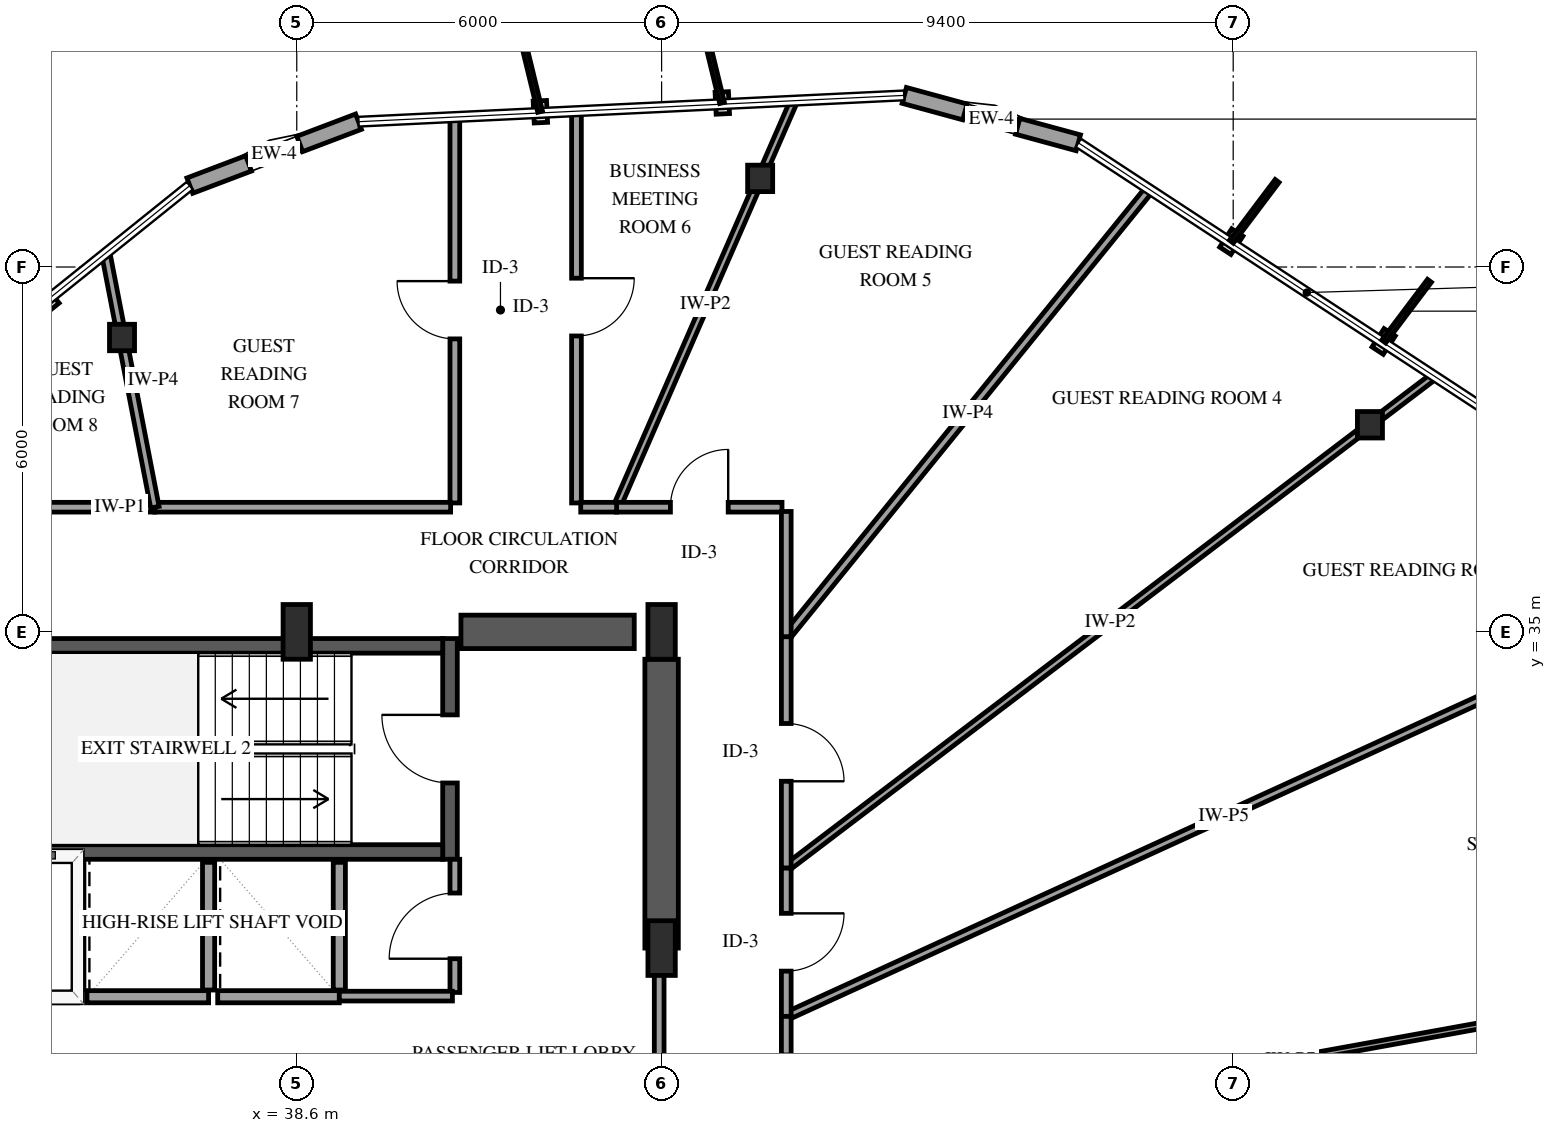
"""IFC4 building model, lengths in metres.
Left out: names, types, materials, properties, quantities, classifications, styles, units other than length and angle.
Written with IfcOpenShell. Run it as: python <this file> out.ifc"""

import sys

from ifc_helpers import new_model, si_unit, direction, frame, frame_2d, origin, origin_2d, place, context, subcontext, project, spatial, rectangle, i_section, extrude, element, fill, save


model = new_model("IFC4")
c1 = context("Model", 3, precision=1e-05, world=origin(), true_north=direction((0.0, 1.0)))
c2 = subcontext(c1, "Body", "Model", "MODEL_VIEW")
j1 = project(units=[si_unit("LENGTHUNIT", "METRE"), si_unit("PLANEANGLEUNIT", "RADIAN")], contexts=[c1])
p1 = place(None, origin())
s1 = spatial("IfcSite", under=j1, at=p1, CompositionType="ELEMENT")
p2 = place(p1, origin())
s2 = spatial("IfcBuilding", under=s1, at=p2, CompositionType="ELEMENT")
p3 = place(p2, frame((0.0, 0.0, 175.0)))
s3 = spatial("IfcBuildingStorey", under=s2, at=p3, CompositionType="ELEMENT", Elevation=175.0)
p4 = place(p3, frame((41.12, 31.26, 0.0), z_axis=(0.0, 0.0, 1.0), x_axis=(0.0, 1.0, 0.0)))
e1 = element("IfcWall", 1, at=p4, inside=s3, PredefinedType="SHEAR", context=c2, shape_type="SweptSolid", body=[
    extrude(rectangle(XDim=3.63, YDim=0.24, at=frame_2d((1.815, 0.0))), origin(), (0.0, 0.0, 1.0), 3.6),
])
p5 = place(p4, frame((1.255, 0.0, 0.0)))
e2 = element("IfcOpeningElement", 2, at=p5, cuts=e1, PredefinedType="OPENING", context=c2, shape_type="SweptSolid", body=[
    extrude(rectangle(XDim=1.12, YDim=2.15, at=frame_2d((0.56, 1.075))), frame((0.0, 0.13, 0.0), z_axis=(0.0, -1.0, 0.0), x_axis=(1.0, 0.0, 0.0)), (0.0, 0.0, 1.0), 0.26),
])
for number, where, z_axis, x_axis in (
    (3, (33.0, 31.38, 0.0), (0.0, 0.0, 1.0), (1.0, 0.0, 0.0)),
    (4, (33.0, 34.77, 0.0), (0.0, 0.0, 1.0), (1.0, 0.0, 0.0)),
):
    element("IfcWall", number, at=place(p3, frame(where, z_axis=z_axis, x_axis=x_axis)), inside=s3, PredefinedType="SHEAR", context=c2, shape_type="SweptSolid", body=[
        extrude(rectangle(XDim=8.0, YDim=0.24, at=frame_2d((4.0, 0.0))), origin(), (0.0, 0.0, 1.0), 3.6),
    ])
p6 = place(p3, frame((41.3, 35.0, 0.0), z_axis=(0.0, 0.0, 1.0), x_axis=(1.0, 0.0, 0.0)))
e5 = element("IfcWall", 5, at=p6, inside=s3, PredefinedType="SHEAR", context=c2, shape_type="SweptSolid", body=[
    extrude(rectangle(XDim=2.85, YDim=0.55, at=frame_2d((1.425, 0.0))), origin(), (0.0, 0.0, 1.0), 3.6),
])
p7 = place(p3, frame((44.6, 29.8, 0.0), z_axis=(0.0, 0.0, 1.0), x_axis=(0.0, 1.0, 0.0)))
e6 = element("IfcWall", 6, at=p7, inside=s3, PredefinedType="SHEAR", context=c2, shape_type="SweptSolid", body=[
    extrude(rectangle(XDim=4.75, YDim=0.55, at=frame_2d((2.375, 0.0))), origin(), (0.0, 0.0, 1.0), 3.6),
])
for number, where, z_axis, x_axis in (
    (7, (38.6, 35.0, 0.0), (0.0, 0.0, 1.0), (1.0, 0.0, 0.0)),
    (8, (44.6, 29.8, 0.0), (0.0, 0.0, 1.0), (1.0, 0.0, 0.0)),
    (9, (44.6, 35.0, 0.0), (0.0, 0.0, 1.0), (1.0, 0.0, 0.0)),
):
    element("IfcColumn", number, at=place(p3, frame(where, z_axis=z_axis, x_axis=x_axis)), inside=s3, PredefinedType="PILASTER", context=c2, shape_type="SweptSolid", body=[
        extrude(rectangle(XDim=0.45, YDim=0.9, at=origin_2d()), origin(), (0.0, 0.0, 1.0), 3.6),
    ])
for number, where, z_axis, x_axis in (
    (10, (56.249, 38.406, 0.0), (0.0, 0.0, 1.0), (1.0, 0.0, 0.0)),
    (11, (46.221, 42.458, 0.0), (0.0, 0.0, 1.0), (1.0, 0.0, 0.0)),
    (12, (35.726, 39.841, 0.0), (0.0, 0.0, 1.0), (1.0, 0.0, 0.0)),
):
    element("IfcColumn", number, at=place(p3, frame(where, z_axis=z_axis, x_axis=x_axis)), inside=s3, PredefinedType="COLUMN", context=c2, shape_type="SweptSolid", body=[
        extrude(i_section(OverallWidth=0.412, OverallDepth=0.435, WebThickness=0.036, FlangeThickness=0.057, FilletRadius=0.038, at=origin_2d()), origin(), (0.0, 0.0, 1.0), 3.6),
    ])
p8 = place(p3, frame((51.453, 43.042, 0.0), z_axis=(0.0, 0.0, 1.0), x_axis=(-0.964809388606, 0.262950268412, 0.0)))
e13 = element("IfcWall", 13, at=p8, inside=s3, PredefinedType="SOLIDWALL", context=c2, shape_type="SweptSolid", body=[
    extrude(rectangle(XDim=2.967, YDim=0.27, at=frame_2d((1.483, 0.0))), origin(), (0.0, 0.0, 1.0), 2.679),
])
p9 = place(p8, frame((1.033, 0.0, 0.75)))
e14 = element("IfcOpeningElement", 14, at=p9, cuts=e13, PredefinedType="OPENING", context=c2, shape_type="SweptSolid", body=[
    extrude(rectangle(XDim=0.9, YDim=1.5, at=frame_2d((0.45, 0.75))), frame((0.0, 0.145, 0.0), z_axis=(0.0, -1.0, 0.0), x_axis=(1.0, 0.0, 0.0)), (0.0, 0.0, 1.0), 0.29),
])
p10 = place(p3, frame((39.615, 43.39, 0.0), z_axis=(0.0, 0.0, 1.0), x_axis=(-0.935082186691, -0.354430958204, 0.0)))
e15 = element("IfcWall", 15, at=p10, inside=s3, PredefinedType="SOLIDWALL", context=c2, shape_type="SweptSolid", body=[
    extrude(rectangle(XDim=2.967, YDim=0.27, at=frame_2d((1.483, 0.0))), origin(), (0.0, 0.0, 1.0), 2.679),
])
p11 = place(p10, frame((1.033, 0.0, 0.75)))
e16 = element("IfcOpeningElement", 16, at=p11, cuts=e15, PredefinedType="OPENING", context=c2, shape_type="SweptSolid", body=[
    extrude(rectangle(XDim=0.9, YDim=1.5, at=frame_2d((0.45, 0.75))), frame((0.0, 0.145, 0.0), z_axis=(0.0, -1.0, 0.0), x_axis=(1.0, 0.0, 0.0)), (0.0, 0.0, 1.0), 0.29),
])
p12 = place(p3, frame((32.72, 29.0, 0.0), z_axis=(0.0, 0.0, 1.0), x_axis=(1.0, 0.0, 0.0)))
e17 = element("IfcWall", 17, at=p12, inside=s3, PredefinedType="SOLIDWALL", context=c2, shape_type="SweptSolid", body=[
    extrude(rectangle(XDim=2.28, YDim=0.2, at=frame_2d((1.14, 0.0))), origin(), (0.0, 0.0, 1.0), 3.3),
])
p13 = place(p12, frame((0.59, 0.0, 0.0)))
e18 = element("IfcOpeningElement", 18, at=p13, cuts=e17, PredefinedType="OPENING", context=c2, shape_type="SweptSolid", body=[
    extrude(rectangle(XDim=1.1, YDim=2.15, at=frame_2d((0.55, 1.075))), frame((0.0, 0.11, 0.0), z_axis=(0.0, -1.0, 0.0), x_axis=(1.0, 0.0, 0.0)), (0.0, 0.0, 1.0), 0.22),
])
p14 = place(p3, frame((35.0, 29.11, 0.0), z_axis=(0.0, 0.0, 1.0), x_axis=(0.0, 1.0, 0.0)))
e19 = element("IfcWall", 19, at=p14, inside=s3, PredefinedType="SOLIDWALL", context=c2, shape_type="SweptSolid", body=[
    extrude(rectangle(XDim=2.1, YDim=0.2, at=frame_2d((1.05, 0.0))), origin(), (0.0, 0.0, 1.0), 3.3),
])
p15 = place(p3, frame((35.15, 29.0, 0.0), z_axis=(0.0, 0.0, 1.0), x_axis=(1.0, 0.0, 0.0)))
e20 = element("IfcWall", 20, at=p15, inside=s3, PredefinedType="SOLIDWALL", context=c2, shape_type="SweptSolid", body=[
    extrude(rectangle(XDim=2.0, YDim=0.2, at=frame_2d((1.0, 0.0))), origin(), (0.0, 0.0, 1.0), 3.3),
])
p16 = place(p3, frame((37.15, 29.11, 0.0), z_axis=(0.0, 0.0, 1.0), x_axis=(0.0, 1.0, 0.0)))
e21 = element("IfcWall", 21, at=p16, inside=s3, PredefinedType="SOLIDWALL", context=c2, shape_type="SweptSolid", body=[
    extrude(rectangle(XDim=2.1, YDim=0.2, at=frame_2d((1.05, 0.0))), origin(), (0.0, 0.0, 1.0), 3.3),
])
p17 = place(p3, frame((37.3, 29.0, 0.0), z_axis=(0.0, 0.0, 1.0), x_axis=(1.0, 0.0, 0.0)))
e22 = element("IfcWall", 22, at=p17, inside=s3, PredefinedType="SOLIDWALL", context=c2, shape_type="SweptSolid", body=[
    extrude(rectangle(XDim=2.0, YDim=0.2, at=frame_2d((1.0, 0.0))), origin(), (0.0, 0.0, 1.0), 3.3),
])
p18 = place(p3, frame((39.3, 29.11, 0.0), z_axis=(0.0, 0.0, 1.0), x_axis=(0.0, 1.0, 0.0)))
e23 = element("IfcWall", 23, at=p18, inside=s3, PredefinedType="SOLIDWALL", context=c2, shape_type="SweptSolid", body=[
    extrude(rectangle(XDim=2.1, YDim=0.2, at=frame_2d((1.05, 0.0))), origin(), (0.0, 0.0, 1.0), 3.3),
])
p19 = place(p3, frame((46.65, 26.458, 0.0), z_axis=(0.0, 0.0, 1.0), x_axis=(0.984001322832, 0.178161153633, 0.0)))
e24 = element("IfcWall", 24, at=p19, inside=s3, PredefinedType="PARTITIONING", context=c2, shape_type="SweptSolid", body=[
    extrude(rectangle(XDim=16.85, YDim=0.1, at=frame_2d((8.425, 0.0))), origin(), (0.0, 0.0, 1.0), 2.595),
])
p20 = place(p3, frame((46.65, 28.677, 0.0), z_axis=(0.0, 0.0, 1.0), x_axis=(0.909580342223, 0.415528098979, 0.0)))
e25 = element("IfcWall", 25, at=p20, inside=s3, PredefinedType="PARTITIONING", context=c2, shape_type="SweptSolid", body=[
    extrude(rectangle(XDim=15.816, YDim=0.13, at=frame_2d((7.908, 0.0))), origin(), (0.0, 0.0, 1.0), 3.3),
])
p21 = place(p3, frame((46.65, 31.115, 0.0), z_axis=(0.0, 0.0, 1.0), x_axis=(0.796308448029, 0.604890779892, 0.0)))
e26 = element("IfcWall", 26, at=p21, inside=s3, PredefinedType="PARTITIONING", context=c2, shape_type="SweptSolid", body=[
    extrude(rectangle(XDim=13.379, YDim=0.12, at=frame_2d((6.69, 0.0))), origin(), (0.0, 0.0, 1.0), 3.3),
])
p22 = place(p3, frame((46.65, 34.921, 0.0), z_axis=(0.0, 0.0, 1.0), x_axis=(0.63011620338, 0.776500850121, 0.0)))
e27 = element("IfcWall", 27, at=p22, inside=s3, PredefinedType="PARTITIONING", context=c2, shape_type="SweptSolid", body=[
    extrude(rectangle(XDim=9.475, YDim=0.14, at=frame_2d((4.737, 0.0))), origin(), (0.0, 0.0, 1.0), 3.3),
])
p23 = place(p3, frame((43.86, 37.05, 0.0), z_axis=(0.0, 0.0, 1.0), x_axis=(0.400042607374, 0.91649654243, 0.0)))
e28 = element("IfcWall", 28, at=p23, inside=s3, PredefinedType="PARTITIONING", context=c2, shape_type="SweptSolid", body=[
    extrude(rectangle(XDim=7.294, YDim=0.12, at=frame_2d((3.647, 0.0))), origin(), (0.0, 0.0, 1.0), 2.595),
])
p24 = place(p3, frame((44.56, 29.8, 0.0), z_axis=(0.0, 0.0, 1.0), x_axis=(0.0, -1.0, 0.0)))
e29 = element("IfcWall", 29, at=p24, inside=s3, PredefinedType="PARTITIONING", context=c2, shape_type="SweptSolid", body=[
    extrude(rectangle(XDim=6.91, YDim=0.16, at=frame_2d((3.455, 0.0))), origin(), (0.0, 0.0, 1.0), 2.34),
])
p25 = place(p24, frame((2.915, 0.0, 0.0)))
e30 = element("IfcOpeningElement", 30, at=p25, cuts=e29, PredefinedType="OPENING", context=c2, shape_type="SweptSolid", body=[
    extrude(rectangle(XDim=1.08, YDim=2.15, at=frame_2d((0.54, 1.075))), frame((0.0, 0.09, 0.0), z_axis=(0.0, -1.0, 0.0), x_axis=(1.0, 0.0, 0.0)), (0.0, 0.0, 1.0), 0.18),
])
p26 = place(p3, frame((43.2, 43.563, 0.0), z_axis=(0.0, 0.0, 1.0), x_axis=(0.0, -1.0, 0.0)))
e31 = element("IfcWall", 31, at=p26, inside=s3, PredefinedType="PARTITIONING", context=c2, shape_type="SweptSolid", body=[
    extrude(rectangle(XDim=6.443, YDim=0.16, at=frame_2d((3.221, 0.0))), origin(), (0.0, 0.0, 1.0), 3.3),
])
p27 = place(p26, frame((2.747, 0.0, 0.0)))
e32 = element("IfcOpeningElement", 32, at=p27, cuts=e31, PredefinedType="OPENING", context=c2, shape_type="SweptSolid", body=[
    extrude(rectangle(XDim=0.95, YDim=2.15, at=frame_2d((0.475, 1.075))), frame((0.0, 0.09, 0.0), z_axis=(0.0, -1.0, 0.0), x_axis=(1.0, 0.0, 0.0)), (0.0, 0.0, 1.0), 0.18),
])
p28 = place(p3, frame((41.2, 37.12, 0.0), z_axis=(0.0, 0.0, 1.0), x_axis=(0.0, 1.0, 0.0)))
e33 = element("IfcWall", 33, at=p28, inside=s3, PredefinedType="PARTITIONING", context=c2, shape_type="SweptSolid", body=[
    extrude(rectangle(XDim=6.346, YDim=0.16, at=frame_2d((3.173, 0.0))), origin(), (0.0, 0.0, 1.0), 2.678),
])
p29 = place(p28, frame((2.698, 0.0, 0.0)))
e34 = element("IfcOpeningElement", 34, at=p29, cuts=e33, PredefinedType="OPENING", context=c2, shape_type="SweptSolid", body=[
    extrude(rectangle(XDim=0.95, YDim=2.15, at=frame_2d((0.475, 1.075))), frame((0.0, 0.09, 0.0), z_axis=(0.0, -1.0, 0.0), x_axis=(1.0, 0.0, 0.0)), (0.0, 0.0, 1.0), 0.18),
])
p30 = place(p3, frame((30.255, 37.05, 0.0), z_axis=(0.0, 0.0, 1.0), x_axis=(1.0, 0.0, 0.0)))
e35 = element("IfcWall", 35, at=p30, inside=s3, PredefinedType="PARTITIONING", context=c2, shape_type="SweptSolid", body=[
    extrude(rectangle(XDim=6.012, YDim=0.16, at=frame_2d((3.006, 0.0))), origin(), (0.0, 0.0, 1.0), 3.3),
])
p31 = place(p30, frame((2.531, 0.0, 0.0)))
e36 = element("IfcOpeningElement", 36, at=p31, cuts=e35, PredefinedType="OPENING", context=c2, shape_type="SweptSolid", body=[
    extrude(rectangle(XDim=0.95, YDim=2.15, at=frame_2d((0.475, 1.075))), frame((0.0, 0.09, 0.0), z_axis=(0.0, -1.0, 0.0), x_axis=(1.0, 0.0, 0.0)), (0.0, 0.0, 1.0), 0.18),
])
p32 = place(p3, frame((36.267, 37.05, 0.0), z_axis=(0.0, 0.0, 1.0), x_axis=(1.0, 0.0, 0.0)))
e37 = element("IfcWall", 37, at=p32, inside=s3, PredefinedType="PARTITIONING", context=c2, shape_type="SweptSolid", body=[
    extrude(rectangle(XDim=4.863, YDim=0.16, at=frame_2d((2.431, 0.0))), origin(), (0.0, 0.0, 1.0), 3.3),
])
p33 = place(p3, frame((36.267, 37.05, 0.0), z_axis=(0.0, 0.0, 1.0), x_axis=(-0.190164640644, 0.981752213875, 0.0)))
e38 = element("IfcWall", 38, at=p33, inside=s3, PredefinedType="PARTITIONING", context=c2, shape_type="SweptSolid", body=[
    extrude(rectangle(XDim=4.255, YDim=0.14, at=frame_2d((2.127, 0.0))), origin(), (0.0, 0.0, 1.0), 2.595),
])
p34 = place(p3, frame((46.65, 34.921, 0.0), z_axis=(0.0, 0.0, 1.0), x_axis=(0.0, -1.0, 0.0)))
e39 = element("IfcWall", 39, at=p34, inside=s3, PredefinedType="PARTITIONING", context=c2, shape_type="SweptSolid", body=[
    extrude(rectangle(XDim=3.806, YDim=0.16, at=frame_2d((1.903, 0.0))), origin(), (0.0, 0.0, 1.0), 3.3),
])
p35 = place(p34, frame((1.428, 0.0, 0.0)))
e40 = element("IfcOpeningElement", 40, at=p35, cuts=e39, PredefinedType="OPENING", context=c2, shape_type="SweptSolid", body=[
    extrude(rectangle(XDim=0.95, YDim=2.15, at=frame_2d((0.475, 1.075))), frame((0.0, 0.09, 0.0), z_axis=(0.0, -1.0, 0.0), x_axis=(1.0, 0.0, 0.0)), (0.0, 0.0, 1.0), 0.18),
])
p36 = place(p3, frame((43.86, 37.05, 0.0), z_axis=(0.0, 0.0, 1.0), x_axis=(1.0, 0.0, 0.0)))
e41 = element("IfcWall", 41, at=p36, inside=s3, PredefinedType="PARTITIONING", context=c2, shape_type="SweptSolid", body=[
    extrude(rectangle(XDim=2.72, YDim=0.16, at=frame_2d((1.36, 0.0))), origin(), (0.0, 0.0, 1.0), 3.3),
])
p37 = place(p36, frame((0.885, 0.0, 0.0)))
e42 = element("IfcOpeningElement", 42, at=p37, cuts=e41, PredefinedType="OPENING", context=c2, shape_type="SweptSolid", body=[
    extrude(rectangle(XDim=0.95, YDim=2.15, at=frame_2d((0.475, 1.075))), frame((0.0, 0.09, 0.0), z_axis=(0.0, -1.0, 0.0), x_axis=(1.0, 0.0, 0.0)), (0.0, 0.0, 1.0), 0.18),
])
p38 = place(p3, frame((46.65, 31.115, 0.0), z_axis=(0.0, 0.0, 1.0), x_axis=(0.0, -1.0, 0.0)))
e43 = element("IfcWall", 43, at=p38, inside=s3, PredefinedType="PARTITIONING", context=c2, shape_type="SweptSolid", body=[
    extrude(rectangle(XDim=2.438, YDim=0.16, at=frame_2d((1.219, 0.0))), origin(), (0.0, 0.0, 1.0), 3.3),
])
p39 = place(p38, frame((0.744, 0.0, 0.0)))
e44 = element("IfcOpeningElement", 44, at=p39, cuts=e43, PredefinedType="OPENING", context=c2, shape_type="SweptSolid", body=[
    extrude(rectangle(XDim=0.95, YDim=2.15, at=frame_2d((0.475, 1.075))), frame((0.0, 0.09, 0.0), z_axis=(0.0, -1.0, 0.0), x_axis=(1.0, 0.0, 0.0)), (0.0, 0.0, 1.0), 0.18),
])
p40 = place(p3, frame((46.65, 28.677, 0.0), z_axis=(0.0, 0.0, 1.0), x_axis=(0.0, -1.0, 0.0)))
e45 = element("IfcWall", 45, at=p40, inside=s3, PredefinedType="PARTITIONING", context=c2, shape_type="SweptSolid", body=[
    extrude(rectangle(XDim=2.219, YDim=0.16, at=frame_2d((1.109, 0.0))), origin(), (0.0, 0.0, 1.0), 3.3),
])
p41 = place(p40, frame((0.635, 0.0, 0.0)))
e46 = element("IfcOpeningElement", 46, at=p41, cuts=e45, PredefinedType="OPENING", context=c2, shape_type="SweptSolid", body=[
    extrude(rectangle(XDim=0.95, YDim=2.15, at=frame_2d((0.475, 1.075))), frame((0.0, 0.09, 0.0), z_axis=(0.0, -1.0, 0.0), x_axis=(1.0, 0.0, 0.0)), (0.0, 0.0, 1.0), 0.18),
])
p42 = place(p3, frame((41.2, 29.07, 0.0), z_axis=(0.0, 0.0, 1.0), x_axis=(0.0, 1.0, 0.0)))
e47 = element("IfcWall", 47, at=p42, inside=s3, PredefinedType="PARTITIONING", context=c2, shape_type="SweptSolid", body=[
    extrude(rectangle(XDim=2.19, YDim=0.16, at=frame_2d((1.095, 0.0))), origin(), (0.0, 0.0, 1.0), 3.3),
])
p43 = place(p42, frame((0.555, 0.0, 0.0)))
e48 = element("IfcOpeningElement", 48, at=p43, cuts=e47, PredefinedType="OPENING", context=c2, shape_type="SweptSolid", body=[
    extrude(rectangle(XDim=1.08, YDim=2.15, at=frame_2d((0.54, 1.075))), frame((0.0, 0.09, 0.0), z_axis=(0.0, -1.0, 0.0), x_axis=(1.0, 0.0, 0.0)), (0.0, 0.0, 1.0), 0.18),
])
p44 = place(p3, frame((46.65, 36.98, 0.0), z_axis=(0.0, 0.0, 1.0), x_axis=(0.0, -1.0, 0.0)))
e49 = element("IfcWall", 49, at=p44, inside=s3, PredefinedType="PARTITIONING", context=c2, shape_type="SweptSolid", body=[
    extrude(rectangle(XDim=2.059, YDim=0.16, at=frame_2d((1.03, 0.0))), origin(), (0.0, 0.0, 1.0), 3.3),
])
p45 = place(p3, frame((39.3, 29.01, 0.0), z_axis=(0.0, 0.0, 1.0), x_axis=(1.0, 0.0, 0.0)))
e50 = element("IfcWall", 50, at=p45, inside=s3, PredefinedType="PARTITIONING", context=c2, shape_type="SweptSolid", body=[
    extrude(rectangle(XDim=1.86, YDim=0.16, at=frame_2d((0.93, 0.0))), origin(), (0.0, 0.0, 1.0), 3.3),
])
p46 = place(p3, frame((43.27, 37.05, 0.0), z_axis=(0.0, 0.0, 1.0), x_axis=(1.0, 0.0, 0.0)))
e51 = element("IfcWall", 51, at=p46, inside=s3, PredefinedType="PARTITIONING", context=c2, shape_type="SweptSolid", body=[
    extrude(rectangle(XDim=0.59, YDim=0.16, at=frame_2d((0.295, 0.0))), origin(), (0.0, 0.0, 1.0), 3.3),
])
p47 = place(p9, origin())
e52 = element("IfcWindow", 52, at=p47, inside=s3, PartitioningType="SINGLE_PANEL", PredefinedType="WINDOW", context=c2, shape_type="SweptSolid", body=[
    extrude(rectangle(XDim=0.9, YDim=1.5, at=frame_2d((0.45, 0.75))), frame((0.0, 0.03, 0.0), z_axis=(0.0, -1.0, 0.0), x_axis=(1.0, 0.0, 0.0)), (0.0, 0.0, 1.0), 0.06),
])
fill(e14, e52)
p48 = place(p11, origin())
e53 = element("IfcWindow", 53, at=p48, inside=s3, PartitioningType="SINGLE_PANEL", PredefinedType="WINDOW", context=c2, shape_type="SweptSolid", body=[
    extrude(rectangle(XDim=0.9, YDim=1.5, at=frame_2d((0.45, 0.75))), frame((0.0, 0.03, 0.0), z_axis=(0.0, -1.0, 0.0), x_axis=(1.0, 0.0, 0.0)), (0.0, 0.0, 1.0), 0.06),
])
fill(e16, e53)
p49 = place(p5, origin())
e54 = element("IfcDoor", 54, at=p49, inside=s3, OperationType="SINGLE_SWING_RIGHT", PredefinedType="DOOR", context=c2, shape_type="SweptSolid", body=[
    extrude(rectangle(XDim=1.12, YDim=2.15, at=frame_2d((0.56, 1.075))), frame((0.0, 0.025, 0.0), z_axis=(0.0, -1.0, 0.0), x_axis=(1.0, 0.0, 0.0)), (0.0, 0.0, 1.0), 0.05),
])
fill(e2, e54)
p50 = place(p27, origin())
e55 = element("IfcDoor", 55, at=p50, inside=s3, OperationType="SINGLE_SWING_LEFT", PredefinedType="DOOR", context=c2, shape_type="SweptSolid", body=[
    extrude(rectangle(XDim=0.95, YDim=2.15, at=frame_2d((0.475, 1.075))), frame((0.0, 0.025, 0.0), z_axis=(0.0, -1.0, 0.0), x_axis=(1.0, 0.0, 0.0)), (0.0, 0.0, 1.0), 0.05),
])
fill(e32, e55)
p51 = place(p29, origin())
e56 = element("IfcDoor", 56, at=p51, inside=s3, OperationType="SINGLE_SWING_RIGHT", PredefinedType="DOOR", context=c2, shape_type="SweptSolid", body=[
    extrude(rectangle(XDim=0.95, YDim=2.15, at=frame_2d((0.475, 1.075))), frame((0.0, 0.025, 0.0), z_axis=(0.0, -1.0, 0.0), x_axis=(1.0, 0.0, 0.0)), (0.0, 0.0, 1.0), 0.05),
])
fill(e34, e56)
p52 = place(p35, origin())
e57 = element("IfcDoor", 57, at=p52, inside=s3, OperationType="SINGLE_SWING_RIGHT", PredefinedType="DOOR", context=c2, shape_type="SweptSolid", body=[
    extrude(rectangle(XDim=0.95, YDim=2.15, at=frame_2d((0.475, 1.075))), frame((0.0, 0.025, 0.0), z_axis=(0.0, -1.0, 0.0), x_axis=(1.0, 0.0, 0.0)), (0.0, 0.0, 1.0), 0.05),
])
fill(e40, e57)
p53 = place(p37, origin())
e58 = element("IfcDoor", 58, at=p53, inside=s3, OperationType="SINGLE_SWING_RIGHT", PredefinedType="DOOR", context=c2, shape_type="SweptSolid", body=[
    extrude(rectangle(XDim=0.95, YDim=2.15, at=frame_2d((0.475, 1.075))), frame((0.0, 0.025, 0.0), z_axis=(0.0, -1.0, 0.0), x_axis=(1.0, 0.0, 0.0)), (0.0, 0.0, 1.0), 0.05),
])
fill(e42, e58)
p54 = place(p39, origin())
e59 = element("IfcDoor", 59, at=p54, inside=s3, OperationType="SINGLE_SWING_LEFT", PredefinedType="DOOR", context=c2, shape_type="SweptSolid", body=[
    extrude(rectangle(XDim=0.95, YDim=2.15, at=frame_2d((0.475, 1.075))), frame((0.0, 0.025, 0.0), z_axis=(0.0, -1.0, 0.0), x_axis=(1.0, 0.0, 0.0)), (0.0, 0.0, 1.0), 0.05),
])
fill(e44, e59)
p55 = place(p43, origin())
e60 = element("IfcDoor", 60, at=p55, inside=s3, OperationType="SINGLE_SWING_LEFT", PredefinedType="DOOR", context=c2, shape_type="SweptSolid", body=[
    extrude(rectangle(XDim=1.08, YDim=2.15, at=frame_2d((0.54, 1.075))), frame((0.0, 0.025, 0.0), z_axis=(0.0, -1.0, 0.0), x_axis=(1.0, 0.0, 0.0)), (0.0, 0.0, 1.0), 0.05),
])
fill(e48, e60)
save(model, sys.argv[1])
